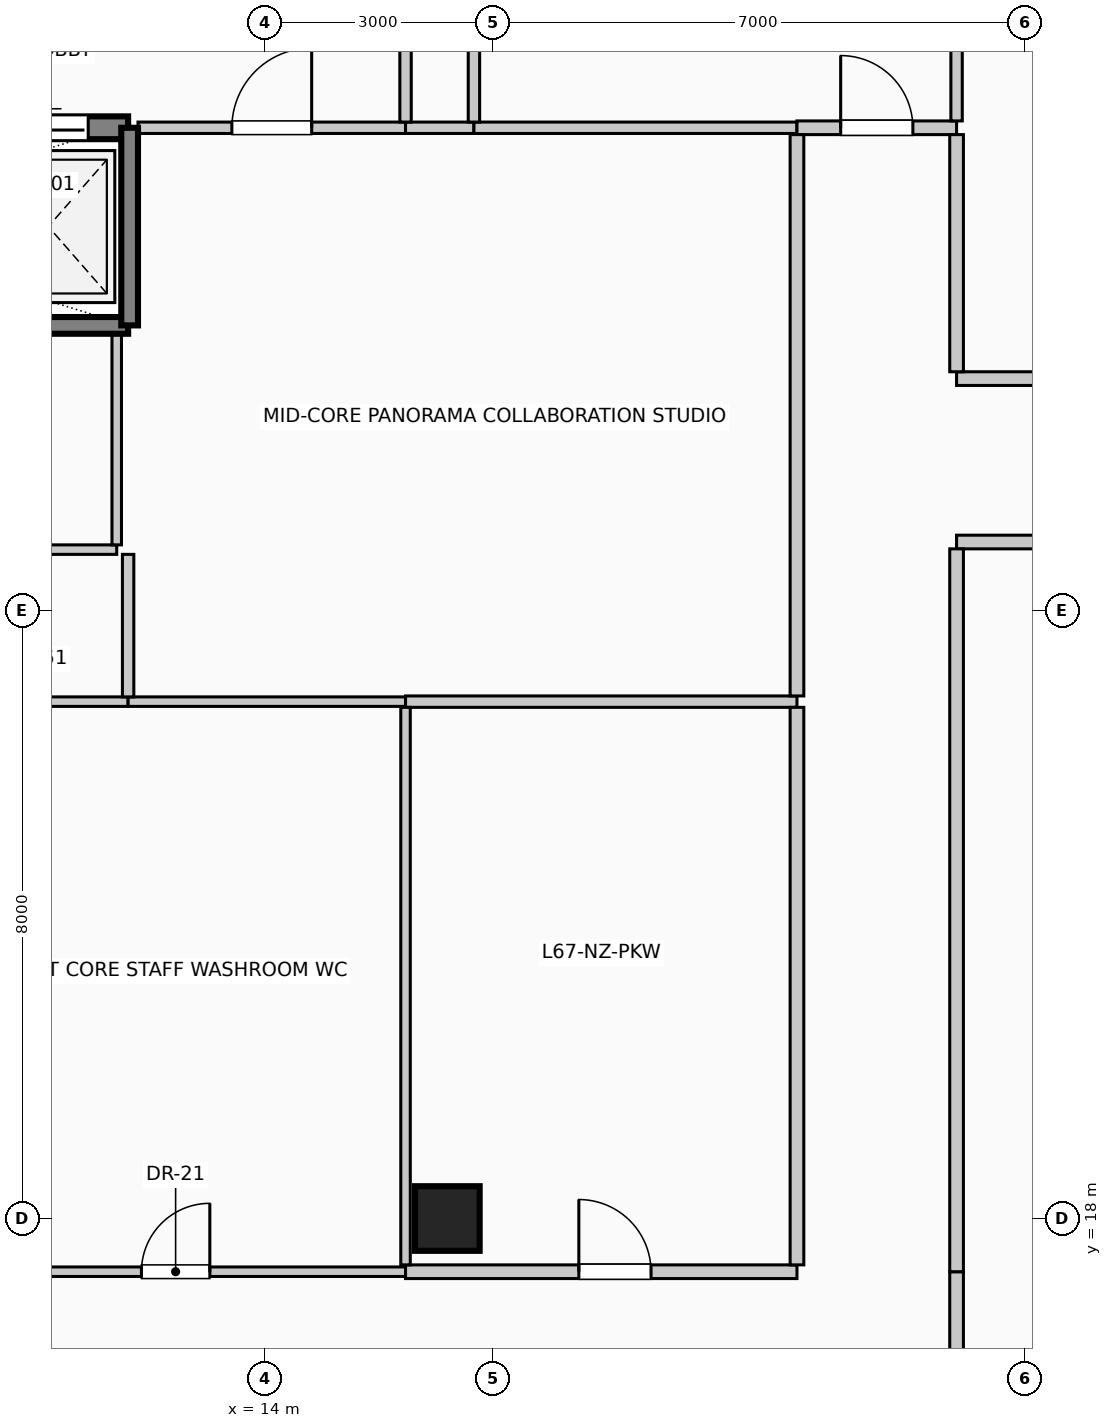
"""IFC4 building model, lengths in metres.
Left out: names, types, materials, properties, quantities, classifications, styles, units other than length and angle.
Written with IfcOpenShell. Run it as: python <this file> out.ifc"""

import sys

from ifc_helpers import new_model, si_unit, direction, frame, frame_2d, origin, origin_2d, place, context, subcontext, project, spatial, rectangle, circle, extrude, element, fill, save


model = new_model("IFC4")
c1 = context("Model", 3, precision=1e-05, world=origin(), true_north=direction((0.0, 1.0)))
c2 = subcontext(c1, "Body", "Model", "MODEL_VIEW")
j1 = project(units=[si_unit("LENGTHUNIT", "METRE"), si_unit("PLANEANGLEUNIT", "RADIAN")], contexts=[c1])
p1 = place(None, origin())
s1 = spatial("IfcSite", under=j1, at=p1, CompositionType="ELEMENT")
p2 = place(p1, origin())
s2 = spatial("IfcBuilding", under=s1, at=p2, CompositionType="ELEMENT")
p3 = place(p2, frame((0.0, 0.0, 276.6)))
s3 = spatial("IfcBuildingStorey", under=s2, at=p3, CompositionType="ELEMENT", Elevation=276.6)
p4 = place(p3, frame((16.4, 18.0, 0.0), z_axis=(0.0, 0.0, 1.0), x_axis=(1.0, 0.0, 0.0)))
e1 = element("IfcColumn", 1, at=p4, inside=s3, PredefinedType="COLUMN", context=c2, shape_type="SweptSolid", body=[
    extrude(circle(Radius=0.425, at=origin_2d()), origin(), (0.0, 0.0, 1.0), 4.0),
])
p5 = place(p3, frame((10.05, 32.35, 0.0), z_axis=(0.0, 0.0, 1.0), x_axis=(1.0, 0.0, 0.0)))
e2 = element("IfcWall", 2, at=p5, inside=s3, PredefinedType="SOLIDWALL", context=c2, shape_type="SweptSolid", body=[
    extrude(rectangle(XDim=2.15, YDim=0.3, at=frame_2d((1.075, 0.0))), origin(), (0.0, 0.0, 1.0), 4.0),
])
p6 = place(p5, frame((0.525, 0.0, 0.0)))
e3 = element("IfcOpeningElement", 3, at=p6, cuts=e2, PredefinedType="OPENING", context=c2, shape_type="SweptSolid", body=[
    extrude(rectangle(XDim=1.1, YDim=2.2, at=frame_2d((0.55, 1.1))), frame((0.0, 0.16, 0.0), z_axis=(0.0, -1.0, 0.0), x_axis=(1.0, 0.0, 0.0)), (0.0, 0.0, 1.0), 0.32),
])
p7 = place(p3, frame((3.55, 29.75, 0.0), z_axis=(0.0, 0.0, 1.0), x_axis=(1.0, 0.0, 0.0)))
e4 = element("IfcWall", 4, at=p7, inside=s3, PredefinedType="SOLIDWALL", context=c2, shape_type="SweptSolid", body=[
    extrude(rectangle(XDim=8.65, YDim=0.22, at=frame_2d((4.325, 0.0))), origin(), (0.0, 0.0, 1.0), 4.0),
])
p8 = place(p3, frame((12.22, 29.75, 0.0), z_axis=(0.0, 0.0, 1.0), x_axis=(0.0, 1.0, 0.0)))
e5 = element("IfcWall", 5, at=p8, inside=s3, PredefinedType="SOLIDWALL", context=c2, shape_type="SweptSolid", body=[
    extrude(rectangle(XDim=2.6, YDim=0.22, at=frame_2d((1.3, 0.0))), origin(), (0.0, 0.0, 1.0), 4.0),
])
p9 = place(p3, frame((9.8, 17.3, 0.0), z_axis=(0.0, 0.0, 1.0), x_axis=(1.0, 0.0, 0.0)))
e6 = element("IfcWall", 6, at=p9, inside=s3, PredefinedType="PARTITIONING", context=c2, shape_type="SweptSolid", body=[
    extrude(rectangle(XDim=6.05, YDim=0.125, at=frame_2d((3.025, 0.0))), origin(), (0.0, 0.0, 1.0), 3.66),
])
p10 = place(p9, frame((2.575, 0.0, 0.0)))
e7 = element("IfcOpeningElement", 7, at=p10, cuts=e6, PredefinedType="OPENING", context=c2, shape_type="SweptSolid", body=[
    extrude(rectangle(XDim=0.9, YDim=2.1, at=frame_2d((0.45, 1.05))), frame((0.0, 0.073, 0.0), z_axis=(0.0, -1.0, 0.0), x_axis=(1.0, 0.0, 0.0)), (0.0, 0.0, 1.0), 0.145),
])
p11 = place(p3, frame((15.85, 17.3, 0.0), z_axis=(0.0, 0.0, 1.0), x_axis=(1.0, 0.0, 0.0)))
e8 = element("IfcWall", 8, at=p11, inside=s3, PredefinedType="PARTITIONING", context=c2, shape_type="SweptSolid", body=[
    extrude(rectangle(XDim=5.15, YDim=0.18, at=frame_2d((2.575, 0.0))), origin(), (0.0, 0.0, 1.0), 3.66),
])
p12 = place(p11, frame((2.28, 0.0, 0.0)))
e9 = element("IfcOpeningElement", 9, at=p12, cuts=e8, PredefinedType="OPENING", context=c2, shape_type="SweptSolid", body=[
    extrude(rectangle(XDim=0.95, YDim=2.15, at=frame_2d((0.475, 1.075))), frame((0.0, 0.1, 0.0), z_axis=(0.0, -1.0, 0.0), x_axis=(1.0, 0.0, 0.0)), (0.0, 0.0, 1.0), 0.2),
])
p13 = place(p3, frame((9.8, 24.8, 0.0), z_axis=(0.0, 0.0, 1.0), x_axis=(1.0, 0.0, 0.0)))
e10 = element("IfcWall", 10, at=p13, inside=s3, PredefinedType="PARTITIONING", context=c2, shape_type="SweptSolid", body=[
    extrude(rectangle(XDim=2.4, YDim=0.125, at=frame_2d((1.2, 0.0))), origin(), (0.0, 0.0, 1.0), 3.66),
])
p14 = place(p3, frame((12.2, 24.8, 0.0), z_axis=(0.0, 0.0, 1.0), x_axis=(1.0, 0.0, 0.0)))
e11 = element("IfcWall", 11, at=p14, inside=s3, PredefinedType="PARTITIONING", context=c2, shape_type="SweptSolid", body=[
    extrude(rectangle(XDim=3.65, YDim=0.125, at=frame_2d((1.825, 0.0))), origin(), (0.0, 0.0, 1.0), 3.66),
])
p15 = place(p3, frame((15.85, 24.8, 0.0), z_axis=(0.0, 0.0, 1.0), x_axis=(1.0, 0.0, 0.0)))
e12 = element("IfcWall", 12, at=p15, inside=s3, PredefinedType="PARTITIONING", context=c2, shape_type="SweptSolid", body=[
    extrude(rectangle(XDim=5.15, YDim=0.15, at=frame_2d((2.575, 0.0))), origin(), (0.0, 0.0, 1.0), 3.66),
])
p16 = place(p3, frame((7.89, 26.8, 0.0), z_axis=(0.0, 0.0, 1.0), x_axis=(1.0, 0.0, 0.0)))
e13 = element("IfcWall", 13, at=p16, inside=s3, PredefinedType="PARTITIONING", context=c2, shape_type="SweptSolid", body=[
    extrude(rectangle(XDim=4.16, YDim=0.125, at=frame_2d((2.08, 0.0))), origin(), (0.0, 0.0, 1.0), 3.66),
])
p17 = place(p16, frame((1.62, 0.0, 0.0)))
e14 = element("IfcOpeningElement", 14, at=p17, cuts=e13, PredefinedType="OPENING", context=c2, shape_type="SweptSolid", body=[
    extrude(rectangle(XDim=0.92, YDim=2.1, at=frame_2d((0.46, 1.05))), frame((0.0, 0.073, 0.0), z_axis=(0.0, -1.0, 0.0), x_axis=(1.0, 0.0, 0.0)), (0.0, 0.0, 1.0), 0.145),
])
p18 = place(p3, frame((23.1, 26.9, 0.0), z_axis=(0.0, 0.0, 1.0), x_axis=(1.0, 0.0, 0.0)))
e15 = element("IfcWall", 15, at=p18, inside=s3, PredefinedType="PARTITIONING", context=c2, shape_type="SweptSolid", body=[
    extrude(rectangle(XDim=14.02, YDim=0.18, at=frame_2d((7.01, 0.0))), origin(), (0.0, 0.0, 1.0), 3.66),
])
p19 = place(p18, frame((6.535, 0.0, 0.0)))
e16 = element("IfcOpeningElement", 16, at=p19, cuts=e15, PredefinedType="OPENING", context=c2, shape_type="SweptSolid", body=[
    extrude(rectangle(XDim=0.95, YDim=2.15, at=frame_2d((0.475, 1.075))), frame((0.0, 0.1, 0.0), z_axis=(0.0, -1.0, 0.0), x_axis=(1.0, 0.0, 0.0)), (0.0, 0.0, 1.0), 0.2),
])
p20 = place(p3, frame((23.1, 29.05, 0.0), z_axis=(0.0, 0.0, 1.0), x_axis=(1.0, 0.0, 0.0)))
e17 = element("IfcWall", 17, at=p20, inside=s3, PredefinedType="PARTITIONING", context=c2, shape_type="SweptSolid", body=[
    extrude(rectangle(XDim=5.56, YDim=0.18, at=frame_2d((2.78, 0.0))), origin(), (0.0, 0.0, 1.0), 3.66),
])
p21 = place(p20, frame((2.305, 0.0, 0.0)))
e18 = element("IfcOpeningElement", 18, at=p21, cuts=e17, PredefinedType="OPENING", context=c2, shape_type="SweptSolid", body=[
    extrude(rectangle(XDim=0.95, YDim=2.15, at=frame_2d((0.475, 1.075))), frame((0.0, 0.1, 0.0), z_axis=(0.0, -1.0, 0.0), x_axis=(1.0, 0.0, 0.0)), (0.0, 0.0, 1.0), 0.2),
])
p22 = place(p3, frame((12.33, 32.35, 0.0), z_axis=(0.0, 0.0, 1.0), x_axis=(1.0, 0.0, 0.0)))
e19 = element("IfcWall", 19, at=p22, inside=s3, PredefinedType="PARTITIONING", context=c2, shape_type="SweptSolid", body=[
    extrude(rectangle(XDim=3.52, YDim=0.15, at=frame_2d((1.76, 0.0))), origin(), (0.0, 0.0, 1.0), 3.66),
])
p23 = place(p22, frame((1.235, 0.0, 0.0)))
e20 = element("IfcOpeningElement", 20, at=p23, cuts=e19, PredefinedType="OPENING", context=c2, shape_type="SweptSolid", body=[
    extrude(rectangle(XDim=1.05, YDim=2.15, at=frame_2d((0.525, 1.075))), frame((0.0, 0.085, 0.0), z_axis=(0.0, -1.0, 0.0), x_axis=(1.0, 0.0, 0.0)), (0.0, 0.0, 1.0), 0.17),
])
p24 = place(p3, frame((15.85, 32.35, 0.0), z_axis=(0.0, 0.0, 1.0), x_axis=(1.0, 0.0, 0.0)))
e21 = element("IfcWall", 21, at=p24, inside=s3, PredefinedType="PARTITIONING", context=c2, shape_type="SweptSolid", body=[
    extrude(rectangle(XDim=0.9, YDim=0.15, at=frame_2d((0.45, 0.0))), origin(), (0.0, 0.0, 1.0), 3.66),
])
p25 = place(p3, frame((16.75, 32.35, 0.0), z_axis=(0.0, 0.0, 1.0), x_axis=(1.0, 0.0, 0.0)))
e22 = element("IfcWall", 22, at=p25, inside=s3, PredefinedType="PARTITIONING", context=c2, shape_type="SweptSolid", body=[
    extrude(rectangle(XDim=4.25, YDim=0.15, at=frame_2d((2.125, 0.0))), origin(), (0.0, 0.0, 1.0), 3.66),
])
p26 = place(p3, frame((21.0, 32.35, 0.0), z_axis=(0.0, 0.0, 1.0), x_axis=(1.0, 0.0, 0.0)))
e23 = element("IfcWall", 23, at=p26, inside=s3, PredefinedType="PARTITIONING", context=c2, shape_type="SweptSolid", body=[
    extrude(rectangle(XDim=2.1, YDim=0.18, at=frame_2d((1.05, 0.0))), origin(), (0.0, 0.0, 1.0), 3.66),
])
p27 = place(p26, frame((0.575, 0.0, 0.0)))
e24 = element("IfcOpeningElement", 24, at=p27, cuts=e23, PredefinedType="OPENING", context=c2, shape_type="SweptSolid", body=[
    extrude(rectangle(XDim=0.95, YDim=2.15, at=frame_2d((0.475, 1.075))), frame((0.0, 0.1, 0.0), z_axis=(0.0, -1.0, 0.0), x_axis=(1.0, 0.0, 0.0)), (0.0, 0.0, 1.0), 0.2),
])
p28 = place(p3, frame((12.05, 26.863, 0.0), z_axis=(0.0, 0.0, 1.0), x_axis=(0.0, 1.0, 0.0)))
e25 = element("IfcWall", 25, at=p28, inside=s3, PredefinedType="PARTITIONING", context=c2, shape_type="SweptSolid", body=[
    extrude(rectangle(XDim=2.777, YDim=0.125, at=frame_2d((1.389, 0.0))), origin(), (0.0, 0.0, 1.0), 3.66),
])
p29 = place(p3, frame((12.2, 24.863, 0.0), z_axis=(0.0, 0.0, 1.0), x_axis=(0.0, 1.0, 0.0)))
e26 = element("IfcWall", 26, at=p29, inside=s3, PredefinedType="PARTITIONING", context=c2, shape_type="SweptSolid", body=[
    extrude(rectangle(XDim=1.875, YDim=0.15, at=frame_2d((0.938, 0.0))), origin(), (0.0, 0.0, 1.0), 3.66),
])
p30 = place(p3, frame((15.85, 17.39, 0.0), z_axis=(0.0, 0.0, 1.0), x_axis=(0.0, 1.0, 0.0)))
e27 = element("IfcWall", 27, at=p30, inside=s3, PredefinedType="PARTITIONING", context=c2, shape_type="SweptSolid", body=[
    extrude(rectangle(XDim=7.335, YDim=0.125, at=frame_2d((3.667, 0.0))), origin(), (0.0, 0.0, 1.0), 3.66),
])
p31 = place(p3, frame((15.85, 32.425, 0.0), z_axis=(0.0, 0.0, 1.0), x_axis=(0.0, 1.0, 0.0)))
e28 = element("IfcWall", 28, at=p31, inside=s3, PredefinedType="PARTITIONING", context=c2, shape_type="SweptSolid", body=[
    extrude(rectangle(XDim=1.725, YDim=0.15, at=frame_2d((0.862, 0.0))), origin(), (0.0, 0.0, 1.0), 3.66),
])
p32 = place(p3, frame((16.75, 32.425, 0.0), z_axis=(0.0, 0.0, 1.0), x_axis=(0.0, 1.0, 0.0)))
e29 = element("IfcWall", 29, at=p32, inside=s3, PredefinedType="PARTITIONING", context=c2, shape_type="SweptSolid", body=[
    extrude(rectangle(XDim=1.15, YDim=0.15, at=frame_2d((0.575, 0.0))), origin(), (0.0, 0.0, 1.0), 3.66),
])
p33 = place(p3, frame((21.0, 17.39, 0.0), z_axis=(0.0, 0.0, 1.0), x_axis=(0.0, 1.0, 0.0)))
e30 = element("IfcWall", 30, at=p33, inside=s3, PredefinedType="PARTITIONING", context=c2, shape_type="SweptSolid", body=[
    extrude(rectangle(XDim=7.335, YDim=0.18, at=frame_2d((3.667, 0.0))), origin(), (0.0, 0.0, 1.0), 3.66),
])
p34 = place(p3, frame((21.0, 24.875, 0.0), z_axis=(0.0, 0.0, 1.0), x_axis=(0.0, 1.0, 0.0)))
e31 = element("IfcWall", 31, at=p34, inside=s3, PredefinedType="PARTITIONING", context=c2, shape_type="SweptSolid", body=[
    extrude(rectangle(XDim=7.385, YDim=0.18, at=frame_2d((3.692, 0.0))), origin(), (0.0, 0.0, 1.0), 3.66),
])
p35 = place(p3, frame((23.1, 15.29, 0.0), z_axis=(0.0, 0.0, 1.0), x_axis=(0.0, 1.0, 0.0)))
e32 = element("IfcWall", 32, at=p35, inside=s3, PredefinedType="PARTITIONING", context=c2, shape_type="SweptSolid", body=[
    extrude(rectangle(XDim=2.01, YDim=0.18, at=frame_2d((1.005, 0.0))), origin(), (0.0, 0.0, 1.0), 3.66),
])
p36 = place(p3, frame((23.1, 17.3, 0.0), z_axis=(0.0, 0.0, 1.0), x_axis=(0.0, 1.0, 0.0)))
e33 = element("IfcWall", 33, at=p36, inside=s3, PredefinedType="PARTITIONING", context=c2, shape_type="SweptSolid", body=[
    extrude(rectangle(XDim=9.51, YDim=0.18, at=frame_2d((4.755, 0.0))), origin(), (0.0, 0.0, 1.0), 3.66),
])
p37 = place(p3, frame((23.1, 29.14, 0.0), z_axis=(0.0, 0.0, 1.0), x_axis=(0.0, 1.0, 0.0)))
e34 = element("IfcWall", 34, at=p37, inside=s3, PredefinedType="PARTITIONING", context=c2, shape_type="SweptSolid", body=[
    extrude(rectangle(XDim=3.12, YDim=0.18, at=frame_2d((1.56, 0.0))), origin(), (0.0, 0.0, 1.0), 3.66),
])
p38 = place(p3, frame((23.1, 32.44, 0.0), z_axis=(0.0, 0.0, 1.0), x_axis=(0.0, 1.0, 0.0)))
e35 = element("IfcWall", 35, at=p38, inside=s3, PredefinedType="PARTITIONING", context=c2, shape_type="SweptSolid", body=[
    extrude(rectangle(XDim=12.84, YDim=0.15, at=frame_2d((6.42, 0.0))), origin(), (0.0, 0.0, 1.0), 3.66),
])
p39 = place(p6, origin())
e36 = element("IfcDoor", 36, at=p39, inside=s3, OperationType="SLIDING_TO_RIGHT", PredefinedType="DOOR", context=c2, shape_type="SweptSolid", body=[
    extrude(rectangle(XDim=1.1, YDim=2.2, at=frame_2d((0.55, 1.1))), frame((0.0, 0.025, 0.0), z_axis=(0.0, -1.0, 0.0), x_axis=(1.0, 0.0, 0.0)), (0.0, 0.0, 1.0), 0.05),
])
fill(e3, e36)
p40 = place(p10, origin())
e37 = element("IfcDoor", 37, at=p40, inside=s3, OperationType="SINGLE_SWING_RIGHT", PredefinedType="DOOR", context=c2, shape_type="SweptSolid", body=[
    extrude(rectangle(XDim=0.9, YDim=2.1, at=frame_2d((0.45, 1.05))), frame((0.0, 0.025, 0.0), z_axis=(0.0, -1.0, 0.0), x_axis=(1.0, 0.0, 0.0)), (0.0, 0.0, 1.0), 0.05),
])
fill(e7, e37)
p41 = place(p12, origin())
e38 = element("IfcDoor", 38, at=p41, inside=s3, OperationType="SINGLE_SWING_LEFT", PredefinedType="DOOR", context=c2, shape_type="SweptSolid", body=[
    extrude(rectangle(XDim=0.95, YDim=2.15, at=frame_2d((0.475, 1.075))), frame((0.0, 0.025, 0.0), z_axis=(0.0, -1.0, 0.0), x_axis=(1.0, 0.0, 0.0)), (0.0, 0.0, 1.0), 0.05),
])
fill(e9, e38)
p42 = place(p23, origin())
e39 = element("IfcDoor", 39, at=p42, inside=s3, OperationType="SINGLE_SWING_RIGHT", PredefinedType="DOOR", context=c2, shape_type="SweptSolid", body=[
    extrude(rectangle(XDim=1.05, YDim=2.15, at=frame_2d((0.525, 1.075))), frame((0.0, 0.025, 0.0), z_axis=(0.0, -1.0, 0.0), x_axis=(1.0, 0.0, 0.0)), (0.0, 0.0, 1.0), 0.05),
])
fill(e20, e39)
p43 = place(p27, origin())
e40 = element("IfcDoor", 40, at=p43, inside=s3, OperationType="SINGLE_SWING_LEFT", PredefinedType="DOOR", context=c2, shape_type="SweptSolid", body=[
    extrude(rectangle(XDim=0.95, YDim=2.15, at=frame_2d((0.475, 1.075))), frame((0.0, 0.025, 0.0), z_axis=(0.0, -1.0, 0.0), x_axis=(1.0, 0.0, 0.0)), (0.0, 0.0, 1.0), 0.05),
])
fill(e24, e40)
save(model, sys.argv[1])
